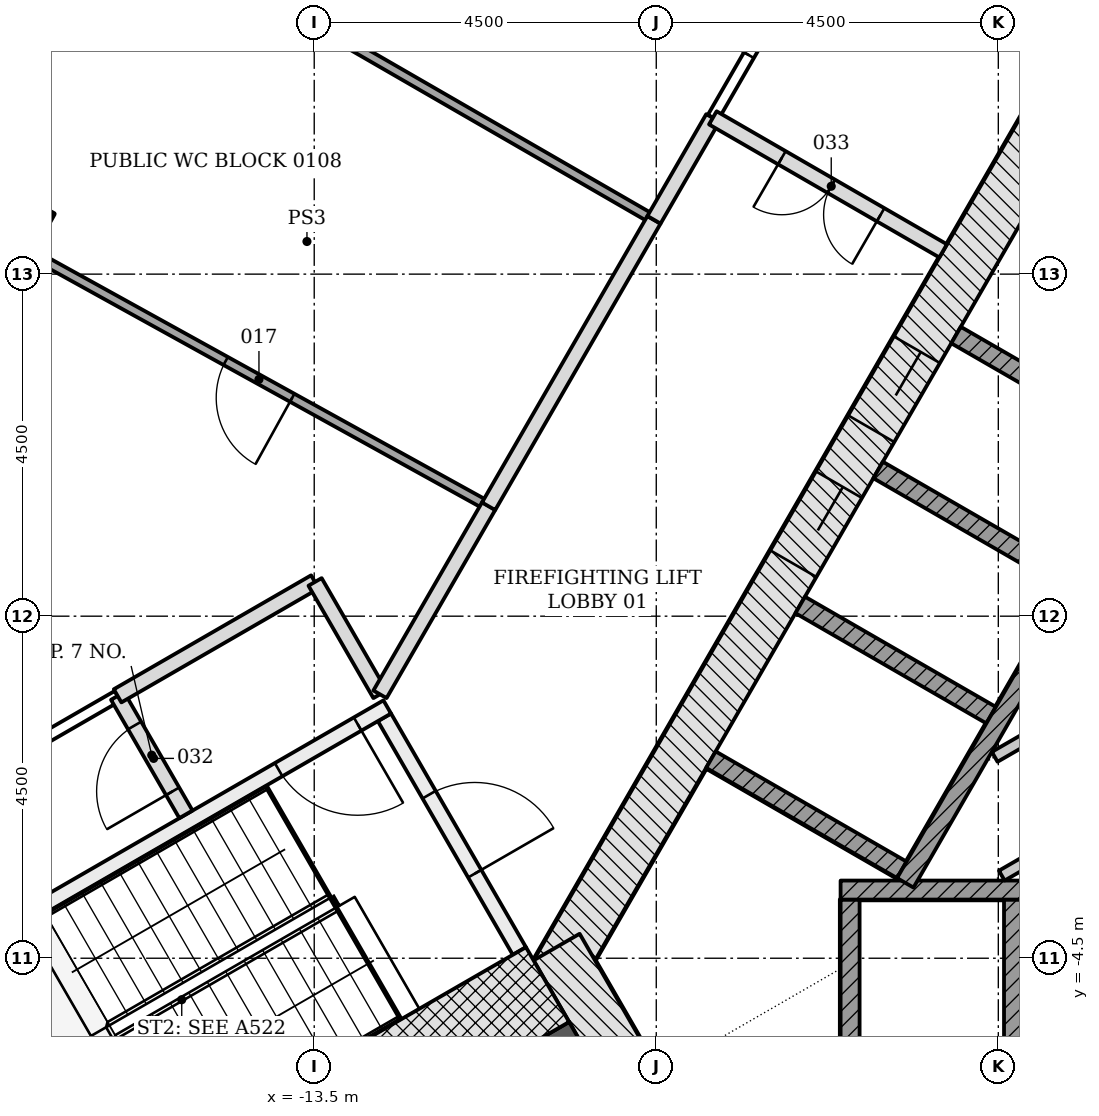
"""IFC4 building model, lengths in metres.
Left out: names, types, materials, properties, quantities, classifications, styles, units other than length and angle.
Written with IfcOpenShell. Run it as: python <this file> out.ifc"""

import sys

from ifc_helpers import new_model, si_unit, direction, frame, frame_2d, origin, origin_2d, place, context, subcontext, project, spatial, polyline, rectangle, outline, extrude, element, fill, save


model = new_model("IFC4")
c1 = context("Model", 3, precision=1e-05, world=origin(), true_north=direction((0.0, 1.0)))
c2 = subcontext(c1, "Body", "Model", "MODEL_VIEW")
j1 = project(units=[si_unit("LENGTHUNIT", "METRE"), si_unit("PLANEANGLEUNIT", "RADIAN")], contexts=[c1])
p1 = place(None, origin())
s1 = spatial("IfcSite", under=j1, at=p1, CompositionType="ELEMENT")
p2 = place(p1, origin())
s2 = spatial("IfcBuilding", under=s1, at=p2, CompositionType="ELEMENT")
p3 = place(p2, frame((0.0, 0.0, 6.0)))
s3 = spatial("IfcBuildingStorey", under=s2, at=p3, CompositionType="ELEMENT", Elevation=6.0)
p4 = place(p3, frame((-17.739, 5.058, -0.25), z_axis=(0.0, 0.0, 1.0), x_axis=(-0.875152760281, 0.483846717641, 0.0)))
e1 = element("IfcColumn", 1, at=p4, inside=s3, PredefinedType="COLUMN", context=c2, shape_type="SweptSolid", body=[
    extrude(rectangle(XDim=1.2, YDim=1.2, at=origin_2d()), origin(), (0.0, 0.0, 1.0), 4.5),
])
p5 = place(p3, frame((-1.083, 11.281, -0.25), z_axis=(0.0, 0.0, 1.0), x_axis=(-0.500001446645, -0.866024568562, 0.0)))
e2 = element("IfcWall", 2, at=p5, inside=s3, PredefinedType="SHEAR", context=c2, shape_type="SweptSolid", body=[
    extrude(rectangle(XDim=18.458, YDim=0.7, at=frame_2d((9.229, 0.0))), origin(), (0.0, 0.0, 1.0), 4.5),
])
p6 = place(p5, frame((8.979, 0.0, 0.25)))
e3 = element("IfcOpeningElement", 3, at=p6, cuts=e2, PredefinedType="OPENING", context=c2, shape_type="SweptSolid", body=[
    extrude(rectangle(XDim=1.2, YDim=2.1, at=frame_2d((0.6, 1.05))), frame((0.0, 0.36, 0.0), z_axis=(0.0, -1.0, 0.0), x_axis=(1.0, 0.0, 0.0)), (0.0, 0.0, 1.0), 0.72),
])
p7 = place(p5, frame((11.029, 0.0, 0.25)))
e4 = element("IfcOpeningElement", 4, at=p7, cuts=e2, PredefinedType="OPENING", context=c2, shape_type="SweptSolid", body=[
    extrude(rectangle(XDim=1.2, YDim=2.1, at=frame_2d((0.6, 1.05))), frame((0.0, 0.36, 0.0), z_axis=(0.0, -1.0, 0.0), x_axis=(1.0, 0.0, 0.0)), (0.0, 0.0, 1.0), 0.72),
])
p8 = place(p3, frame((-10.311, -4.353, -0.25), z_axis=(0.0, 0.0, 1.0), x_axis=(0.500042739161, -0.866000726912, 0.0)))
e5 = element("IfcWall", 5, at=p8, inside=s3, PredefinedType="SHEAR", context=c2, shape_type="SweptSolid", body=[
    extrude(rectangle(XDim=2.771, YDim=0.7, at=frame_2d((1.386, 0.0))), origin(), (0.0, 0.0, 1.0), 4.5),
])
p9 = place(p3, frame((-9.922, -5.728, -0.25), z_axis=(0.0, 0.0, 1.0), x_axis=(-0.866028046028, -0.499995423472, 0.0)))
e6 = element("IfcWall", 6, at=p9, inside=s3, PredefinedType="SHEAR", context=c2, shape_type="SweptSolid", body=[
    extrude(rectangle(XDim=14.633, YDim=0.9, at=frame_2d((7.316, 0.0))), origin(), (0.0, 0.0, 1.0), 4.5),
])
p10 = place(p9, frame((7.35, 0.0, 0.25)))
e7 = element("IfcOpeningElement", 7, at=p10, cuts=e6, PredefinedType="OPENING", context=c2, shape_type="SweptSolid", body=[
    extrude(rectangle(XDim=1.5, YDim=2.1, at=frame_2d((0.75, 1.05))), frame((0.0, 0.46, 0.0), z_axis=(0.0, -1.0, 0.0), x_axis=(1.0, 0.0, 0.0)), (0.0, 0.0, 1.0), 0.92),
])
for number, where, z_axis, x_axis in (
    (8, (-6.45, -6.228, -0.25), (0.0, 0.0, 1.0), (0.0, 1.0, 0.0)),
    (9, (-4.3, -6.228, -0.25), (0.0, 0.0, 1.0), (0.0, 1.0, 0.0)),
):
    element("IfcWall", number, at=place(p3, frame(where, z_axis=z_axis, x_axis=x_axis)), inside=s3, PredefinedType="PARTITIONING", context=c2, shape_type="SweptSolid", body=[
        extrude(rectangle(XDim=2.5, YDim=0.25, at=frame_2d((1.25, 0.0))), origin(), (0.0, 0.0, 1.0), 4.5),
    ])
p11 = place(p3, frame((-6.575, -3.603, 0.0), z_axis=(0.0, 0.0, 1.0), x_axis=(1.0, 0.0, 0.0)))
e10 = element("IfcWall", 10, at=p11, inside=s3, PredefinedType="PARTITIONING", context=c2, shape_type="SweptSolid", body=[
    extrude(rectangle(XDim=13.15, YDim=0.25, at=frame_2d((6.575, 0.0))), origin(), (0.0, 0.0, 1.0), 4.25),
])
for number, where, z_axis, x_axis in (
    (11, (-5.056, 3.699, -0.25), (0.0, 0.0, 1.0), (0.866, -0.5, 0.0)),
    (12, (-6.081, 1.923, -0.25), (0.0, 0.0, 1.0), (0.866, -0.5, 0.0)),
    (13, (-7.106, 0.148, -0.25), (0.0, 0.0, 1.0), (0.866, -0.5, 0.0)),
    (14, (-8.281, -1.887, -0.25), (0.0, 0.0, 1.0), (0.866, -0.5, 0.0)),
):
    element("IfcWall", number, at=place(p3, frame(where, z_axis=z_axis, x_axis=x_axis)), inside=s3, PredefinedType="PARTITIONING", context=c2, shape_type="SweptSolid", body=[
        extrude(rectangle(XDim=2.9, YDim=0.25, at=frame_2d((1.45, 0.0))), origin(), (0.0, 0.0, 1.0), 4.5),
    ])
p12 = place(p3, frame((0.176, 6.711, 0.0), z_axis=(0.0, 0.0, 1.0), x_axis=(-0.500004227369, -0.866022963098, 0.0)))
e15 = element("IfcWall", 15, at=p12, inside=s3, PredefinedType="PARTITIONING", context=c2, shape_type="SweptSolid", body=[
    extrude(rectangle(XDim=11.8, YDim=0.25, at=frame_2d((5.9, 0.0))), origin(), (0.0, 0.0, 1.0), 4.25),
])
p13 = place(p3, frame((-4.548, -1.851, 0.0), z_axis=(0.0, 0.0, 1.0), x_axis=(0.866023939251, 0.500002536638, 0.0)))
e16 = element("IfcWall", 16, at=p13, inside=s3, PredefinedType="PARTITIONING", context=c2, shape_type="SweptSolid", body=[
    extrude(rectangle(XDim=11.092, YDim=0.15, at=frame_2d((5.546, 0.0))), origin(), (0.0, 0.0, 1.0), 4.25),
])
p14 = place(p13, frame((3.497, 0.0, 0.0)))
e17 = element("IfcOpeningElement", 17, at=p14, cuts=e16, PredefinedType="OPENING", context=c2, shape_type="SweptSolid", body=[
    extrude(rectangle(XDim=0.9, YDim=2.1, at=frame_2d((0.45, 1.05))), frame((0.0, 0.085, 0.0), z_axis=(0.0, -1.0, 0.0), x_axis=(1.0, 0.0, 0.0)), (0.0, 0.0, 1.0), 0.17),
])
p15 = place(p3, frame((-4.454, -3.413, 0.0), z_axis=(0.0, 0.0, 1.0), x_axis=(0.86603043987, 0.499991277142, 0.0)))
e18 = element("IfcWall", 18, at=p15, inside=s3, PredefinedType="PARTITIONING", context=c2, shape_type="SweptSolid", body=[
    extrude(rectangle(XDim=11.792, YDim=0.15, at=frame_2d((5.896, 0.0))), origin(), (0.0, 0.0, 1.0), 4.25),
])
p16 = place(p15, frame((3.847, 0.0, 0.0)))
e19 = element("IfcOpeningElement", 19, at=p16, cuts=e18, PredefinedType="OPENING", context=c2, shape_type="SweptSolid", body=[
    extrude(rectangle(XDim=0.9, YDim=2.1, at=frame_2d((0.45, 1.05))), frame((0.0, 0.085, 0.0), z_axis=(0.0, -1.0, 0.0), x_axis=(1.0, 0.0, 0.0)), (0.0, 0.0, 1.0), 0.17),
])
p17 = place(p3, frame((-12.576, -1.331, -0.25), z_axis=(0.0, 0.0, 1.0), x_axis=(0.499970499736, -0.8660424351, 0.0)))
e20 = element("IfcWall", 20, at=p17, inside=s3, PredefinedType="SHEAR", context=c2, shape_type="SweptSolid", body=[
    extrude(rectangle(XDim=3.55, YDim=0.2, at=frame_2d((1.775, 0.0))), origin(), (0.0, 0.0, 1.0), 4.5),
])
p18 = place(p17, frame((1.175, 0.0, 0.25)))
e21 = element("IfcOpeningElement", 21, at=p18, cuts=e20, PredefinedType="OPENING", context=c2, shape_type="SweptSolid", body=[
    extrude(rectangle(XDim=1.2, YDim=2.1, at=frame_2d((0.6, 1.05))), frame((0.0, 0.11, 0.0), z_axis=(0.0, -1.0, 0.0), x_axis=(1.0, 0.0, 0.0)), (0.0, 0.0, 1.0), 0.22),
])
p19 = place(p3, frame((-12.539, -1.194, -0.25), z_axis=(0.0, 0.0, 1.0), x_axis=(-0.866045472092, -0.499965239061, 0.0)))
e22 = element("IfcWall", 22, at=p19, inside=s3, PredefinedType="SHEAR", context=c2, shape_type="SweptSolid", body=[
    extrude(rectangle(XDim=5.6, YDim=0.2, at=frame_2d((2.8, 0.0))), origin(), (0.0, 0.0, 1.0), 4.5),
])
p20 = place(p19, frame((0.45, 0.0, 0.25)))
e23 = element("IfcOpeningElement", 23, at=p20, cuts=e22, PredefinedType="OPENING", context=c2, shape_type="SweptSolid", body=[
    extrude(rectangle(XDim=1.2, YDim=2.1, at=frame_2d((0.6, 1.05))), frame((0.0, 0.11, 0.0), z_axis=(0.0, -1.0, 0.0), x_axis=(1.0, 0.0, 0.0)), (0.0, 0.0, 1.0), 0.22),
])
p21 = place(p3, frame((-10.43, -4.847, -0.25), z_axis=(0.0, 0.0, 1.0), x_axis=(-0.866018442252, -0.500012057535, 0.0)))
e24 = element("IfcWall", 24, at=p21, inside=s3, PredefinedType="SHEAR", context=c2, shape_type="SweptSolid", body=[
    extrude(rectangle(XDim=7.2, YDim=1.136, at=frame_2d((3.6, 0.0))), origin(), (0.0, 0.0, 1.0), 4.5),
])
p22 = place(p3, frame((0.0, 0.0, -0.25)))
e25 = element("IfcWall", 25, at=p22, inside=s3, PredefinedType="SHEAR", context=c2, shape_type="SweptSolid", body=[
    extrude(outline(polyline([(-17.439, -3.907), (-18.025, -6.093), (-16.95, -7.955), (-16.777, -7.855), (-17.81, -6.065), (-17.267, -4.039), (-17.339, -4.081), (-17.339, -4.081), (-17.339, -4.081), (-17.339, -4.081), (-17.339, -4.081), (-17.339, -4.081), (-17.339, -4.081), (-17.339, -4.081), (-17.339, -4.081), (-17.339, -4.081), (-17.339, -4.081), (-17.339, -4.081), (-17.339, -4.081), (-17.339, -4.081), (-17.339, -4.081), (-17.339, -4.081), (-17.339, -4.081), (-17.439, -3.907)])), origin(), (0.0, 0.0, 1.0), 4.5),
])
p23 = place(p3, frame((-16.087, -1.049, 0.0), z_axis=(0.0, 0.0, 1.0), x_axis=(-0.866071706002, -0.49991979363, 0.0)))
e26 = element("IfcWall", 26, at=p23, inside=s3, PredefinedType="PARTITIONING", context=c2, shape_type="SweptSolid", body=[
    extrude(rectangle(XDim=5.105, YDim=0.15, at=frame_2d((2.552, 0.0))), origin(), (0.0, 0.0, 1.0), 3.638),
])
p24 = place(p23, frame((1.65, 0.0, 0.0)))
e27 = element("IfcOpeningElement", 27, at=p24, cuts=e26, PredefinedType="OPENING", context=c2, shape_type="SweptSolid", body=[
    extrude(rectangle(XDim=1.8, YDim=2.1, at=frame_2d((0.9, 1.05))), frame((0.0, 0.085, 0.0), z_axis=(0.0, -1.0, 0.0), x_axis=(1.0, 0.0, 0.0)), (0.0, 0.0, 1.0), 0.17),
])
p25 = place(p3, frame((-15.188, -2.607, 0.0), z_axis=(0.0, 0.0, 1.0), x_axis=(-0.500024172624, 0.866011447264, 0.0)))
e28 = element("IfcWall", 28, at=p25, inside=s3, PredefinedType="PARTITIONING", context=c2, shape_type="SweptSolid", body=[
    extrude(rectangle(XDim=1.798, YDim=0.2, at=frame_2d((0.899, 0.0))), origin(), (0.0, 0.0, 1.0), 3.638),
])
p26 = place(p25, frame((0.35, 0.0, 0.0)))
e29 = element("IfcOpeningElement", 29, at=p26, cuts=e28, PredefinedType="OPENING", context=c2, shape_type="SweptSolid", body=[
    extrude(rectangle(XDim=1.0, YDim=2.1, at=frame_2d((0.5, 1.05))), frame((0.0, 0.11, 0.0), z_axis=(0.0, -1.0, 0.0), x_axis=(1.0, 0.0, 0.0)), (0.0, 0.0, 1.0), 0.22),
])
p27 = place(p3, frame((-16.087, -1.048, 0.0), z_axis=(0.0, 0.0, 1.0), x_axis=(0.865988915629, 0.500063194015, 0.0)))
e30 = element("IfcWall", 30, at=p27, inside=s3, PredefinedType="PARTITIONING", context=c2, shape_type="SweptSolid", body=[
    extrude(rectangle(XDim=2.998, YDim=0.2, at=frame_2d((1.499, 0.0))), origin(), (0.0, 0.0, 1.0), 3.638),
])
p28 = place(p3, frame((-13.489, 0.451, 0.0), z_axis=(0.0, 0.0, 1.0), x_axis=(0.500044178772, -0.865999895656, 0.0)))
e31 = element("IfcWall", 31, at=p28, inside=s3, PredefinedType="PARTITIONING", context=c2, shape_type="SweptSolid", body=[
    extrude(rectangle(XDim=1.708, YDim=0.2, at=frame_2d((0.854, 0.0))), origin(), (0.0, 0.0, 1.0), 4.25),
])
p29 = place(p3, frame((-12.635, -1.028, 0.0), z_axis=(0.0, 0.0, 1.0), x_axis=(0.50005725472, 0.865992345233, 0.0)))
e32 = element("IfcWall", 32, at=p29, inside=s3, PredefinedType="PARTITIONING", context=c2, shape_type="SweptSolid", body=[
    extrude(rectangle(XDim=2.862, YDim=0.2, at=frame_2d((1.431, 0.0))), origin(), (0.0, 0.0, 1.0), 3.638),
])
p30 = place(p3, frame((-11.208, 1.446, 0.0), z_axis=(0.0, 0.0, 1.0), x_axis=(-0.875125393946, 0.483896212912, 0.0)))
e33 = element("IfcWall", 33, at=p30, inside=s3, PredefinedType="PARTITIONING", context=c2, shape_type="SweptSolid", body=[
    extrude(rectangle(XDim=6.863, YDim=0.12, at=frame_2d((3.432, 0.0))), origin(), (0.0, 0.0, 1.0), 3.638),
])
p31 = place(p30, frame((2.95, 0.0, 0.0)))
e34 = element("IfcOpeningElement", 34, at=p31, cuts=e33, PredefinedType="OPENING", context=c2, shape_type="SweptSolid", body=[
    extrude(rectangle(XDim=1.0, YDim=2.1, at=frame_2d((0.5, 1.05))), frame((0.0, 0.07, 0.0), z_axis=(0.0, -1.0, 0.0), x_axis=(1.0, 0.0, 0.0)), (0.0, 0.0, 1.0), 0.14),
])
p32 = place(p3, frame((-9.031, 5.213, 0.0), z_axis=(0.0, 0.0, 1.0), x_axis=(-0.500044734646, -0.865999574684, 0.0)))
e35 = element("IfcWall", 35, at=p32, inside=s3, PredefinedType="PARTITIONING", context=c2, shape_type="SweptSolid", body=[
    extrude(rectangle(XDim=4.35, YDim=0.2, at=frame_2d((2.175, 0.0))), origin(), (0.0, 0.0, 1.0), 3.638),
])
p33 = place(p3, frame((-8.256, 6.555, 0.0), z_axis=(0.0, 0.0, 1.0), x_axis=(-0.500177701192, -0.865922783642, 0.0)))
e36 = element("IfcWall", 36, at=p33, inside=s3, PredefinedType="PARTITIONING", context=c2, shape_type="SweptSolid", body=[
    extrude(rectangle(XDim=1.547, YDim=0.2, at=frame_2d((0.774, 0.0))), origin(), (0.0, 0.0, 1.0), 3.638),
])
p34 = place(p3, frame((-5.226, 4.806, 0.0), z_axis=(0.0, 0.0, 1.0), x_axis=(-0.865949687125, 0.500131122175, 0.0)))
e37 = element("IfcWall", 37, at=p34, inside=s3, PredefinedType="PARTITIONING", context=c2, shape_type="SweptSolid", body=[
    extrude(rectangle(XDim=3.499, YDim=0.2, at=frame_2d((1.75, 0.0))), origin(), (0.0, 0.0, 1.0), 4.25),
])
p35 = place(p34, frame((0.95, 0.0, 0.0)))
e38 = element("IfcOpeningElement", 38, at=p35, cuts=e37, PredefinedType="OPENING", context=c2, shape_type="SweptSolid", body=[
    extrude(rectangle(XDim=1.5, YDim=2.1, at=frame_2d((0.75, 1.05))), frame((0.0, 0.11, 0.0), z_axis=(0.0, -1.0, 0.0), x_axis=(1.0, 0.0, 0.0)), (0.0, 0.0, 1.0), 0.22),
])
p36 = place(p3, frame((-9.032, 5.215, 0.0), z_axis=(0.0, 0.0, 1.0), x_axis=(-0.866130767322, 0.499817460578, 0.0)))
e39 = element("IfcWall", 39, at=p36, inside=s3, PredefinedType="PARTITIONING", context=c2, shape_type="SweptSolid", body=[
    extrude(rectangle(XDim=4.597, YDim=0.12, at=frame_2d((2.299, 0.0))), origin(), (0.0, 0.0, 1.0), 3.638),
])
p37 = place(p3, frame((-8.256, 6.558, 0.0), z_axis=(0.0, 0.0, 1.0), x_axis=(0.500081734942, 0.86597820895, 0.0)))
e40 = element("IfcWall", 40, at=p37, inside=s3, PredefinedType="PARTITIONING", context=c2, shape_type="SweptSolid", body=[
    extrude(rectangle(XDim=2.804, YDim=0.15, at=frame_2d((1.402, 0.0))), origin(), (0.0, 0.0, 1.0), 3.638),
])
p38 = place(p37, frame((0.95, 0.0, 0.0)))
e41 = element("IfcOpeningElement", 41, at=p38, cuts=e40, PredefinedType="OPENING", context=c2, shape_type="SweptSolid", body=[
    extrude(rectangle(XDim=1.0, YDim=2.1, at=frame_2d((0.5, 1.05))), frame((0.0, 0.085, 0.0), z_axis=(0.0, -1.0, 0.0), x_axis=(1.0, 0.0, 0.0)), (0.0, 0.0, 1.0), 0.17),
])
p39 = place(p6, origin())
e42 = element("IfcDoor", 42, at=p39, inside=s3, OperationType="DOUBLE_DOOR_SLIDING", PredefinedType="DOOR", context=c2, shape_type="SweptSolid", body=[
    extrude(rectangle(XDim=1.2, YDim=2.1, at=frame_2d((0.6, 1.05))), frame((0.0, 0.025, 0.0), z_axis=(0.0, -1.0, 0.0), x_axis=(1.0, 0.0, 0.0)), (0.0, 0.0, 1.0), 0.05),
])
fill(e3, e42)
p40 = place(p7, origin())
e43 = element("IfcDoor", 43, at=p40, inside=s3, OperationType="DOUBLE_DOOR_SLIDING", PredefinedType="DOOR", context=c2, shape_type="SweptSolid", body=[
    extrude(rectangle(XDim=1.2, YDim=2.1, at=frame_2d((0.6, 1.05))), frame((0.0, 0.025, 0.0), z_axis=(0.0, -1.0, 0.0), x_axis=(1.0, 0.0, 0.0)), (0.0, 0.0, 1.0), 0.05),
])
fill(e4, e43)
p41 = place(p18, origin())
e44 = element("IfcDoor", 44, at=p41, inside=s3, OperationType="SINGLE_SWING_RIGHT", PredefinedType="DOOR", context=c2, shape_type="SweptSolid", body=[
    extrude(rectangle(XDim=1.2, YDim=2.1, at=frame_2d((0.6, 1.05))), frame((0.0, 0.025, 0.0), z_axis=(0.0, -1.0, 0.0), x_axis=(1.0, 0.0, 0.0)), (0.0, 0.0, 1.0), 0.05),
])
fill(e21, e44)
p42 = place(p20, origin())
e45 = element("IfcDoor", 45, at=p42, inside=s3, OperationType="SINGLE_SWING_LEFT", PredefinedType="DOOR", context=c2, shape_type="SweptSolid", body=[
    extrude(rectangle(XDim=1.2, YDim=2.1, at=frame_2d((0.6, 1.05))), frame((0.0, 0.025, 0.0), z_axis=(0.0, -1.0, 0.0), x_axis=(1.0, 0.0, 0.0)), (0.0, 0.0, 1.0), 0.05),
])
fill(e23, e45)
p43 = place(p31, origin())
e46 = element("IfcDoor", 46, at=p43, inside=s3, OperationType="SINGLE_SWING_LEFT", PredefinedType="DOOR", context=c2, shape_type="SweptSolid", body=[
    extrude(rectangle(XDim=1.0, YDim=2.1, at=frame_2d((0.5, 1.05))), frame((0.0, 0.025, 0.0), z_axis=(0.0, -1.0, 0.0), x_axis=(1.0, 0.0, 0.0)), (0.0, 0.0, 1.0), 0.05),
])
fill(e34, e46)
p44 = place(p38, origin())
e47 = element("IfcDoor", 47, at=p44, inside=s3, OperationType="SINGLE_SWING_RIGHT", PredefinedType="DOOR", context=c2, shape_type="SweptSolid", body=[
    extrude(rectangle(XDim=1.0, YDim=2.1, at=frame_2d((0.5, 1.05))), frame((0.0, 0.025, 0.0), z_axis=(0.0, -1.0, 0.0), x_axis=(1.0, 0.0, 0.0)), (0.0, 0.0, 1.0), 0.05),
])
fill(e41, e47)
p45 = place(p26, origin())
e48 = element("IfcDoor", 48, at=p45, inside=s3, OperationType="SINGLE_SWING_LEFT", PredefinedType="DOOR", context=c2, shape_type="SweptSolid", body=[
    extrude(rectangle(XDim=1.0, YDim=2.1, at=frame_2d((0.5, 1.05))), frame((0.0, 0.025, 0.0), z_axis=(0.0, -1.0, 0.0), x_axis=(1.0, 0.0, 0.0)), (0.0, 0.0, 1.0), 0.05),
])
fill(e29, e48)
p46 = place(p35, origin())
e49 = element("IfcDoor", 49, at=p46, inside=s3, OperationType="DOUBLE_DOOR_SINGLE_SWING", PredefinedType="DOOR", context=c2, shape_type="SweptSolid", body=[
    extrude(rectangle(XDim=1.5, YDim=2.1, at=frame_2d((0.75, 1.05))), frame((0.0, 0.025, 0.0), z_axis=(0.0, -1.0, 0.0), x_axis=(1.0, 0.0, 0.0)), (0.0, 0.0, 1.0), 0.05),
])
fill(e38, e49)
save(model, sys.argv[1])
